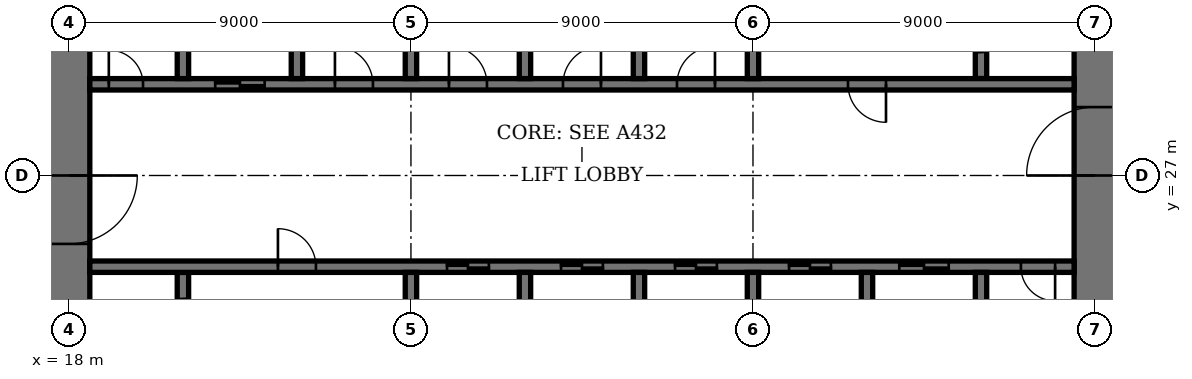
"""IFC4 building model, lengths in metres.
Left out: names, types, materials, properties, quantities, classifications, styles, units other than length and angle.
Written with IfcOpenShell. Run it as: python <this file> out.ifc"""

import sys

from ifc_helpers import new_model, si_unit, direction, frame, frame_2d, origin, place, context, subcontext, project, spatial, rectangle, extrude, element, fill, save


model = new_model("IFC4")
c1 = context("Model", 3, precision=1e-05, world=origin(), true_north=direction((0.0, 1.0)))
c2 = subcontext(c1, "Body", "Model", "MODEL_VIEW")
j1 = project(units=[si_unit("LENGTHUNIT", "METRE"), si_unit("PLANEANGLEUNIT", "RADIAN")], contexts=[c1])
p1 = place(None, origin())
s1 = spatial("IfcSite", under=j1, at=p1, CompositionType="ELEMENT")
p2 = place(p1, origin())
s2 = spatial("IfcBuilding", under=s1, at=p2, CompositionType="ELEMENT")
p3 = place(p2, frame((0.0, 0.0, 255.4)))
s3 = spatial("IfcBuildingStorey", under=s2, at=p3, CompositionType="ELEMENT", Elevation=255.4)
p4 = place(p3, frame((18.0, 35.45, 0.0), z_axis=(0.0, 0.0, 1.0), x_axis=(0.0, -1.0, 0.0)))
e1 = element("IfcWall", 1, at=p4, inside=s3, PredefinedType="SHEAR", context=c2, shape_type="SweptSolid", body=[
    extrude(rectangle(XDim=16.9, YDim=1.1, at=frame_2d((8.45, 0.0))), origin(), (0.0, 0.0, 1.0), 4.0),
])
p5 = place(p4, frame((8.45, 0.0, 0.0)))
e2 = element("IfcOpeningElement", 2, at=p5, cuts=e1, PredefinedType="OPENING", context=c2, shape_type="SweptSolid", body=[
    extrude(rectangle(XDim=1.8, YDim=2.4, at=frame_2d((0.9, 1.2))), frame((0.0, 0.56, 0.0), z_axis=(0.0, -1.0, 0.0), x_axis=(1.0, 0.0, 0.0)), (0.0, 0.0, 1.0), 1.12),
])
p6 = place(p3, frame((45.0, 18.55, 0.0), z_axis=(0.0, 0.0, 1.0), x_axis=(0.0, 1.0, 0.0)))
e3 = element("IfcWall", 3, at=p6, inside=s3, PredefinedType="SHEAR", context=c2, shape_type="SweptSolid", body=[
    extrude(rectangle(XDim=16.9, YDim=1.1, at=frame_2d((8.45, 0.0))), origin(), (0.0, 0.0, 1.0), 4.0),
])
p7 = place(p6, frame((8.45, 0.0, 0.0)))
e4 = element("IfcOpeningElement", 4, at=p7, cuts=e3, PredefinedType="OPENING", context=c2, shape_type="SweptSolid", body=[
    extrude(rectangle(XDim=1.8, YDim=2.4, at=frame_2d((0.9, 1.2))), frame((0.0, 0.56, 0.0), z_axis=(0.0, -1.0, 0.0), x_axis=(1.0, 0.0, 0.0)), (0.0, 0.0, 1.0), 1.12),
])
p8 = place(p3, frame((21.0, 21.95, 0.0), z_axis=(0.0, 0.0, 1.0), x_axis=(0.0, 1.0, 0.0)))
e5 = element("IfcWall", 5, at=p8, inside=s3, PredefinedType="SHEAR", context=c2, shape_type="SweptSolid", body=[
    extrude(rectangle(XDim=2.5, YDim=0.3, at=frame_2d((1.25, 0.0))), origin(), (0.0, 0.0, 1.0), 4.0),
])
p9 = place(p8, frame((0.7, 0.0, 0.0)))
e6 = element("IfcOpeningElement", 6, at=p9, cuts=e5, PredefinedType="OPENING", context=c2, shape_type="SweptSolid", body=[
    extrude(rectangle(XDim=1.1, YDim=2.4, at=frame_2d((0.55, 1.2))), frame((0.0, 0.16, 0.0), z_axis=(0.0, -1.0, 0.0), x_axis=(1.0, 0.0, 0.0)), (0.0, 0.0, 1.0), 0.32),
])
p10 = place(p3, frame((42.0, 29.55, 0.0), z_axis=(0.0, 0.0, 1.0), x_axis=(0.0, 1.0, 0.0)))
e7 = element("IfcWall", 7, at=p10, inside=s3, PredefinedType="SHEAR", context=c2, shape_type="SweptSolid", body=[
    extrude(rectangle(XDim=2.5, YDim=0.3, at=frame_2d((1.25, 0.0))), origin(), (0.0, 0.0, 1.0), 4.0),
])
p11 = place(p10, frame((0.7, 0.0, 0.0)))
e8 = element("IfcOpeningElement", 8, at=p11, cuts=e7, PredefinedType="OPENING", context=c2, shape_type="SweptSolid", body=[
    extrude(rectangle(XDim=1.1, YDim=2.4, at=frame_2d((0.55, 1.2))), frame((0.0, 0.16, 0.0), z_axis=(0.0, -1.0, 0.0), x_axis=(1.0, 0.0, 0.0)), (0.0, 0.0, 1.0), 0.32),
])
p12 = place(p3, frame((18.55, 24.6, 0.0), z_axis=(0.0, 0.0, 1.0), x_axis=(1.0, 0.0, 0.0)))
e9 = element("IfcWall", 9, at=p12, inside=s3, PredefinedType="SHEAR", context=c2, shape_type="SweptSolid", body=[
    extrude(rectangle(XDim=25.9, YDim=0.3, at=frame_2d((12.95, 0.0))), origin(), (0.0, 0.0, 1.0), 4.0),
])
p13 = place(p12, frame((4.95, 0.0, 0.0)))
e10 = element("IfcOpeningElement", 10, at=p13, cuts=e9, PredefinedType="OPENING", context=c2, shape_type="SweptSolid", body=[
    extrude(rectangle(XDim=1.0, YDim=2.4, at=frame_2d((0.5, 1.2))), frame((0.0, 0.16, 0.0), z_axis=(0.0, -1.0, 0.0), x_axis=(1.0, 0.0, 0.0)), (0.0, 0.0, 1.0), 0.32),
])
p14 = place(p12, frame((24.5, 0.0, 0.0)))
e11 = element("IfcOpeningElement", 11, at=p14, cuts=e9, PredefinedType="OPENING", context=c2, shape_type="SweptSolid", body=[
    extrude(rectangle(XDim=0.9, YDim=2.1, at=frame_2d((0.45, 1.05))), frame((0.0, 0.16, 0.0), z_axis=(0.0, -1.0, 0.0), x_axis=(1.0, 0.0, 0.0)), (0.0, 0.0, 1.0), 0.32),
])
p15 = place(p12, frame((9.4, 0.0, 0.0)))
e12 = element("IfcOpeningElement", 12, at=p15, cuts=e9, PredefinedType="OPENING", context=c2, shape_type="SweptSolid", body=[
    extrude(rectangle(XDim=1.1, YDim=2.4, at=frame_2d((0.55, 1.2))), frame((0.0, 0.16, 0.0), z_axis=(0.0, -1.0, 0.0), x_axis=(1.0, 0.0, 0.0)), (0.0, 0.0, 1.0), 0.32),
])
p16 = place(p12, frame((12.4, 0.0, 0.0)))
e13 = element("IfcOpeningElement", 13, at=p16, cuts=e9, PredefinedType="OPENING", context=c2, shape_type="SweptSolid", body=[
    extrude(rectangle(XDim=1.1, YDim=2.4, at=frame_2d((0.55, 1.2))), frame((0.0, 0.16, 0.0), z_axis=(0.0, -1.0, 0.0), x_axis=(1.0, 0.0, 0.0)), (0.0, 0.0, 1.0), 0.32),
])
p17 = place(p12, frame((15.4, 0.0, 0.0)))
e14 = element("IfcOpeningElement", 14, at=p17, cuts=e9, PredefinedType="OPENING", context=c2, shape_type="SweptSolid", body=[
    extrude(rectangle(XDim=1.1, YDim=2.4, at=frame_2d((0.55, 1.2))), frame((0.0, 0.16, 0.0), z_axis=(0.0, -1.0, 0.0), x_axis=(1.0, 0.0, 0.0)), (0.0, 0.0, 1.0), 0.32),
])
p18 = place(p12, frame((18.4, 0.0, 0.0)))
e15 = element("IfcOpeningElement", 15, at=p18, cuts=e9, PredefinedType="OPENING", context=c2, shape_type="SweptSolid", body=[
    extrude(rectangle(XDim=1.1, YDim=2.4, at=frame_2d((0.55, 1.2))), frame((0.0, 0.16, 0.0), z_axis=(0.0, -1.0, 0.0), x_axis=(1.0, 0.0, 0.0)), (0.0, 0.0, 1.0), 0.32),
])
p19 = place(p12, frame((21.3, 0.0, 0.0)))
e16 = element("IfcOpeningElement", 16, at=p19, cuts=e9, PredefinedType="OPENING", context=c2, shape_type="SweptSolid", body=[
    extrude(rectangle(XDim=1.3, YDim=2.4, at=frame_2d((0.65, 1.2))), frame((0.0, 0.16, 0.0), z_axis=(0.0, -1.0, 0.0), x_axis=(1.0, 0.0, 0.0)), (0.0, 0.0, 1.0), 0.32),
])
p20 = place(p3, frame((18.55, 29.4, 0.0), z_axis=(0.0, 0.0, 1.0), x_axis=(1.0, 0.0, 0.0)))
e17 = element("IfcWall", 17, at=p20, inside=s3, PredefinedType="SHEAR", context=c2, shape_type="SweptSolid", body=[
    extrude(rectangle(XDim=25.9, YDim=0.3, at=frame_2d((12.95, 0.0))), origin(), (0.0, 0.0, 1.0), 4.0),
])
p21 = place(p20, frame((19.95, 0.0, 0.0)))
e18 = element("IfcOpeningElement", 18, at=p21, cuts=e17, PredefinedType="OPENING", context=c2, shape_type="SweptSolid", body=[
    extrude(rectangle(XDim=1.0, YDim=2.4, at=frame_2d((0.5, 1.2))), frame((0.0, 0.16, 0.0), z_axis=(0.0, -1.0, 0.0), x_axis=(1.0, 0.0, 0.0)), (0.0, 0.0, 1.0), 0.32),
])
p22 = place(p20, frame((0.5, 0.0, 0.0)))
e19 = element("IfcOpeningElement", 19, at=p22, cuts=e17, PredefinedType="OPENING", context=c2, shape_type="SweptSolid", body=[
    extrude(rectangle(XDim=0.9, YDim=2.1, at=frame_2d((0.45, 1.05))), frame((0.0, 0.16, 0.0), z_axis=(0.0, -1.0, 0.0), x_axis=(1.0, 0.0, 0.0)), (0.0, 0.0, 1.0), 0.32),
])
p23 = place(p20, frame((15.45, 0.0, 0.0)))
e20 = element("IfcOpeningElement", 20, at=p23, cuts=e17, PredefinedType="OPENING", context=c2, shape_type="SweptSolid", body=[
    extrude(rectangle(XDim=1.0, YDim=2.4, at=frame_2d((0.5, 1.2))), frame((0.0, 0.16, 0.0), z_axis=(0.0, -1.0, 0.0), x_axis=(1.0, 0.0, 0.0)), (0.0, 0.0, 1.0), 0.32),
])
p24 = place(p20, frame((12.45, 0.0, 0.0)))
e21 = element("IfcOpeningElement", 21, at=p24, cuts=e17, PredefinedType="OPENING", context=c2, shape_type="SweptSolid", body=[
    extrude(rectangle(XDim=1.0, YDim=2.4, at=frame_2d((0.5, 1.2))), frame((0.0, 0.16, 0.0), z_axis=(0.0, -1.0, 0.0), x_axis=(1.0, 0.0, 0.0)), (0.0, 0.0, 1.0), 0.32),
])
p25 = place(p20, frame((9.45, 0.0, 0.0)))
e22 = element("IfcOpeningElement", 22, at=p25, cuts=e17, PredefinedType="OPENING", context=c2, shape_type="SweptSolid", body=[
    extrude(rectangle(XDim=1.0, YDim=2.4, at=frame_2d((0.5, 1.2))), frame((0.0, 0.16, 0.0), z_axis=(0.0, -1.0, 0.0), x_axis=(1.0, 0.0, 0.0)), (0.0, 0.0, 1.0), 0.32),
])
p26 = place(p20, frame((6.45, 0.0, 0.0)))
e23 = element("IfcOpeningElement", 23, at=p26, cuts=e17, PredefinedType="OPENING", context=c2, shape_type="SweptSolid", body=[
    extrude(rectangle(XDim=1.0, YDim=2.4, at=frame_2d((0.5, 1.2))), frame((0.0, 0.16, 0.0), z_axis=(0.0, -1.0, 0.0), x_axis=(1.0, 0.0, 0.0)), (0.0, 0.0, 1.0), 0.32),
])
p27 = place(p20, frame((3.3, 0.0, 0.0)))
e24 = element("IfcOpeningElement", 24, at=p27, cuts=e17, PredefinedType="OPENING", context=c2, shape_type="SweptSolid", body=[
    extrude(rectangle(XDim=1.3, YDim=2.4, at=frame_2d((0.65, 1.2))), frame((0.0, 0.16, 0.0), z_axis=(0.0, -1.0, 0.0), x_axis=(1.0, 0.0, 0.0)), (0.0, 0.0, 1.0), 0.32),
])
for number, where, z_axis, x_axis in (
    (25, (30.0, 21.75, 0.0), (0.0, 0.0, 1.0), (0.0, 1.0, 0.0)),
    (26, (33.0, 29.55, 0.0), (0.0, 0.0, 1.0), (0.0, 1.0, 0.0)),
    (27, (33.0, 21.75, 0.0), (0.0, 0.0, 1.0), (0.0, 1.0, 0.0)),
    (28, (30.0, 29.55, 0.0), (0.0, 0.0, 1.0), (0.0, 1.0, 0.0)),
    (29, (36.0, 21.75, 0.0), (0.0, 0.0, 1.0), (0.0, 1.0, 0.0)),
    (30, (27.0, 29.55, 0.0), (0.0, 0.0, 1.0), (0.0, 1.0, 0.0)),
):
    element("IfcWall", number, at=place(p3, frame(where, z_axis=z_axis, x_axis=x_axis)), inside=s3, PredefinedType="SHEAR", context=c2, shape_type="SweptSolid", body=[
        extrude(rectangle(XDim=2.7, YDim=0.3, at=frame_2d((1.35, 0.0))), origin(), (0.0, 0.0, 1.0), 4.0),
    ])
for number, where, z_axis, x_axis in (
    (31, (39.0, 18.55, 0.0), (0.0, 0.0, 1.0), (0.0, 1.0, 0.0)),
    (32, (24.0, 29.55, 0.0), (0.0, 0.0, 1.0), (0.0, 1.0, 0.0)),
):
    element("IfcWall", number, at=place(p3, frame(where, z_axis=z_axis, x_axis=x_axis)), inside=s3, PredefinedType="SHEAR", context=c2, shape_type="SweptSolid", body=[
        extrude(rectangle(XDim=5.9, YDim=0.3, at=frame_2d((2.95, 0.0))), origin(), (0.0, 0.0, 1.0), 4.0),
    ])
for number, where, z_axis, x_axis in (
    (33, (42.0, 21.75, 0.0), (0.0, 0.0, 1.0), (0.0, 1.0, 0.0)),
    (34, (21.0, 29.55, 0.0), (0.0, 0.0, 1.0), (0.0, 1.0, 0.0)),
):
    element("IfcWall", number, at=place(p3, frame(where, z_axis=z_axis, x_axis=x_axis)), inside=s3, PredefinedType="SHEAR", context=c2, shape_type="SweptSolid", body=[
        extrude(rectangle(XDim=2.7, YDim=0.3, at=frame_2d((1.35, 0.0))), origin(), (0.0, 0.0, 1.0), 4.0),
    ])
for number, where, z_axis, x_axis in (
    (35, (27.0, 21.6, 0.0), (0.0, 0.0, 1.0), (0.0, 1.0, 0.0)),
    (36, (36.0, 29.55, 0.0), (0.0, 0.0, 1.0), (0.0, 1.0, 0.0)),
):
    element("IfcWall", number, at=place(p3, frame(where, z_axis=z_axis, x_axis=x_axis)), inside=s3, PredefinedType="SHEAR", context=c2, shape_type="SweptSolid", body=[
        extrude(rectangle(XDim=2.85, YDim=0.3, at=frame_2d((1.425, 0.0))), origin(), (0.0, 0.0, 1.0), 4.0),
    ])
p28 = place(p5, origin())
e37 = element("IfcDoor", 37, at=p28, inside=s3, OperationType="DOUBLE_DOOR_DOUBLE_SWING", PredefinedType="DOOR", context=c2, shape_type="SweptSolid", body=[
    extrude(rectangle(XDim=1.8, YDim=2.4, at=frame_2d((0.9, 1.2))), frame((0.0, 0.03, 0.0), z_axis=(0.0, -1.0, 0.0), x_axis=(1.0, 0.0, 0.0)), (0.0, 0.0, 1.0), 0.06),
    extrude(rectangle(XDim=0.04, YDim=2.4, at=frame_2d((0.02, 1.2))), frame((0.0, 0.55, 0.0), z_axis=(0.0, -1.0, 0.0), x_axis=(1.0, 0.0, 0.0)), (0.0, 0.0, 1.0), 1.1),
    extrude(rectangle(XDim=0.04, YDim=2.4, at=frame_2d((1.78, 1.2))), frame((0.0, 0.55, 0.0), z_axis=(0.0, -1.0, 0.0), x_axis=(1.0, 0.0, 0.0)), (0.0, 0.0, 1.0), 1.1),
    extrude(rectangle(XDim=1.8, YDim=0.04, at=frame_2d((0.9, 2.38))), frame((0.0, 0.55, 0.0), z_axis=(0.0, -1.0, 0.0), x_axis=(1.0, 0.0, 0.0)), (0.0, 0.0, 1.0), 1.1),
])
fill(e2, e37)
p29 = place(p7, origin())
e38 = element("IfcDoor", 38, at=p29, inside=s3, OperationType="DOUBLE_DOOR_DOUBLE_SWING", PredefinedType="DOOR", context=c2, shape_type="SweptSolid", body=[
    extrude(rectangle(XDim=1.8, YDim=2.4, at=frame_2d((0.9, 1.2))), frame((0.0, 0.03, 0.0), z_axis=(0.0, -1.0, 0.0), x_axis=(1.0, 0.0, 0.0)), (0.0, 0.0, 1.0), 0.06),
    extrude(rectangle(XDim=0.04, YDim=2.4, at=frame_2d((0.02, 1.2))), frame((0.0, 0.55, 0.0), z_axis=(0.0, -1.0, 0.0), x_axis=(1.0, 0.0, 0.0)), (0.0, 0.0, 1.0), 1.1),
    extrude(rectangle(XDim=0.04, YDim=2.4, at=frame_2d((1.78, 1.2))), frame((0.0, 0.55, 0.0), z_axis=(0.0, -1.0, 0.0), x_axis=(1.0, 0.0, 0.0)), (0.0, 0.0, 1.0), 1.1),
    extrude(rectangle(XDim=1.8, YDim=0.04, at=frame_2d((0.9, 2.38))), frame((0.0, 0.55, 0.0), z_axis=(0.0, -1.0, 0.0), x_axis=(1.0, 0.0, 0.0)), (0.0, 0.0, 1.0), 1.1),
])
fill(e4, e38)
p30 = place(p13, origin())
e39 = element("IfcDoor", 39, at=p30, inside=s3, OperationType="SINGLE_SWING_RIGHT", PredefinedType="DOOR", context=c2, shape_type="SweptSolid", body=[
    extrude(rectangle(XDim=1.0, YDim=2.4, at=frame_2d((0.5, 1.2))), frame((0.0, 0.03, 0.0), z_axis=(0.0, -1.0, 0.0), x_axis=(1.0, 0.0, 0.0)), (0.0, 0.0, 1.0), 0.06),
])
fill(e10, e39)
p31 = place(p21, origin())
e40 = element("IfcDoor", 40, at=p31, inside=s3, OperationType="SINGLE_SWING_RIGHT", PredefinedType="DOOR", context=c2, shape_type="SweptSolid", body=[
    extrude(rectangle(XDim=1.0, YDim=2.4, at=frame_2d((0.5, 1.2))), frame((0.0, 0.03, 0.0), z_axis=(0.0, -1.0, 0.0), x_axis=(1.0, 0.0, 0.0)), (0.0, 0.0, 1.0), 0.06),
])
fill(e18, e40)
p32 = place(p14, origin())
e41 = element("IfcDoor", 41, at=p32, inside=s3, OperationType="SINGLE_SWING_RIGHT", PredefinedType="DOOR", context=c2, shape_type="SweptSolid", body=[
    extrude(rectangle(XDim=0.9, YDim=2.1, at=frame_2d((0.45, 1.05))), frame((0.0, 0.03, 0.0), z_axis=(0.0, -1.0, 0.0), x_axis=(1.0, 0.0, 0.0)), (0.0, 0.0, 1.0), 0.06),
])
fill(e11, e41)
p33 = place(p22, origin())
e42 = element("IfcDoor", 42, at=p33, inside=s3, OperationType="SINGLE_SWING_RIGHT", PredefinedType="DOOR", context=c2, shape_type="SweptSolid", body=[
    extrude(rectangle(XDim=0.9, YDim=2.1, at=frame_2d((0.45, 1.05))), frame((0.0, 0.03, 0.0), z_axis=(0.0, -1.0, 0.0), x_axis=(1.0, 0.0, 0.0)), (0.0, 0.0, 1.0), 0.06),
])
fill(e19, e42)
p34 = place(p15, origin())
e43 = element("IfcDoor", 43, at=p34, inside=s3, OperationType="DOUBLE_DOOR_SLIDING", PredefinedType="DOOR", context=c2, shape_type="SweptSolid", body=[
    extrude(rectangle(XDim=1.1, YDim=2.4, at=frame_2d((0.55, 1.2))), frame((0.0, 0.02, 0.0), z_axis=(0.0, -1.0, 0.0), x_axis=(1.0, 0.0, 0.0)), (0.0, 0.0, 1.0), 0.04),
])
fill(e12, e43)
p35 = place(p16, origin())
e44 = element("IfcDoor", 44, at=p35, inside=s3, OperationType="DOUBLE_DOOR_SLIDING", PredefinedType="DOOR", context=c2, shape_type="SweptSolid", body=[
    extrude(rectangle(XDim=1.1, YDim=2.4, at=frame_2d((0.55, 1.2))), frame((0.0, 0.02, 0.0), z_axis=(0.0, -1.0, 0.0), x_axis=(1.0, 0.0, 0.0)), (0.0, 0.0, 1.0), 0.04),
])
fill(e13, e44)
p36 = place(p17, origin())
e45 = element("IfcDoor", 45, at=p36, inside=s3, OperationType="DOUBLE_DOOR_SLIDING", PredefinedType="DOOR", context=c2, shape_type="SweptSolid", body=[
    extrude(rectangle(XDim=1.1, YDim=2.4, at=frame_2d((0.55, 1.2))), frame((0.0, 0.02, 0.0), z_axis=(0.0, -1.0, 0.0), x_axis=(1.0, 0.0, 0.0)), (0.0, 0.0, 1.0), 0.04),
])
fill(e14, e45)
p37 = place(p18, origin())
e46 = element("IfcDoor", 46, at=p37, inside=s3, OperationType="DOUBLE_DOOR_SLIDING", PredefinedType="DOOR", context=c2, shape_type="SweptSolid", body=[
    extrude(rectangle(XDim=1.1, YDim=2.4, at=frame_2d((0.55, 1.2))), frame((0.0, 0.02, 0.0), z_axis=(0.0, -1.0, 0.0), x_axis=(1.0, 0.0, 0.0)), (0.0, 0.0, 1.0), 0.04),
])
fill(e15, e46)
p38 = place(p23, origin())
e47 = element("IfcDoor", 47, at=p38, inside=s3, OperationType="SINGLE_SWING_LEFT", PredefinedType="DOOR", context=c2, shape_type="SweptSolid", body=[
    extrude(rectangle(XDim=1.0, YDim=2.4, at=frame_2d((0.5, 1.2))), frame((0.0, 0.03, 0.0), z_axis=(0.0, -1.0, 0.0), x_axis=(1.0, 0.0, 0.0)), (0.0, 0.0, 1.0), 0.06),
])
fill(e20, e47)
p39 = place(p24, origin())
e48 = element("IfcDoor", 48, at=p39, inside=s3, OperationType="SINGLE_SWING_LEFT", PredefinedType="DOOR", context=c2, shape_type="SweptSolid", body=[
    extrude(rectangle(XDim=1.0, YDim=2.4, at=frame_2d((0.5, 1.2))), frame((0.0, 0.03, 0.0), z_axis=(0.0, -1.0, 0.0), x_axis=(1.0, 0.0, 0.0)), (0.0, 0.0, 1.0), 0.06),
])
fill(e21, e48)
p40 = place(p25, origin())
e49 = element("IfcDoor", 49, at=p40, inside=s3, OperationType="SINGLE_SWING_RIGHT", PredefinedType="DOOR", context=c2, shape_type="SweptSolid", body=[
    extrude(rectangle(XDim=1.0, YDim=2.4, at=frame_2d((0.5, 1.2))), frame((0.0, 0.03, 0.0), z_axis=(0.0, -1.0, 0.0), x_axis=(1.0, 0.0, 0.0)), (0.0, 0.0, 1.0), 0.06),
])
fill(e22, e49)
p41 = place(p26, origin())
e50 = element("IfcDoor", 50, at=p41, inside=s3, OperationType="SINGLE_SWING_RIGHT", PredefinedType="DOOR", context=c2, shape_type="SweptSolid", body=[
    extrude(rectangle(XDim=1.0, YDim=2.4, at=frame_2d((0.5, 1.2))), frame((0.0, 0.03, 0.0), z_axis=(0.0, -1.0, 0.0), x_axis=(1.0, 0.0, 0.0)), (0.0, 0.0, 1.0), 0.06),
])
fill(e23, e50)
p42 = place(p19, origin())
e51 = element("IfcDoor", 51, at=p42, inside=s3, OperationType="DOUBLE_DOOR_SLIDING", PredefinedType="DOOR", context=c2, shape_type="SweptSolid", body=[
    extrude(rectangle(XDim=1.3, YDim=2.4, at=frame_2d((0.65, 1.2))), frame((0.0, 0.02, 0.0), z_axis=(0.0, -1.0, 0.0), x_axis=(1.0, 0.0, 0.0)), (0.0, 0.0, 1.0), 0.04),
])
fill(e16, e51)
p43 = place(p27, origin())
e52 = element("IfcDoor", 52, at=p43, inside=s3, OperationType="DOUBLE_DOOR_SLIDING", PredefinedType="DOOR", context=c2, shape_type="SweptSolid", body=[
    extrude(rectangle(XDim=1.3, YDim=2.4, at=frame_2d((0.65, 1.2))), frame((0.0, 0.02, 0.0), z_axis=(0.0, -1.0, 0.0), x_axis=(1.0, 0.0, 0.0)), (0.0, 0.0, 1.0), 0.04),
])
fill(e24, e52)
save(model, sys.argv[1])
